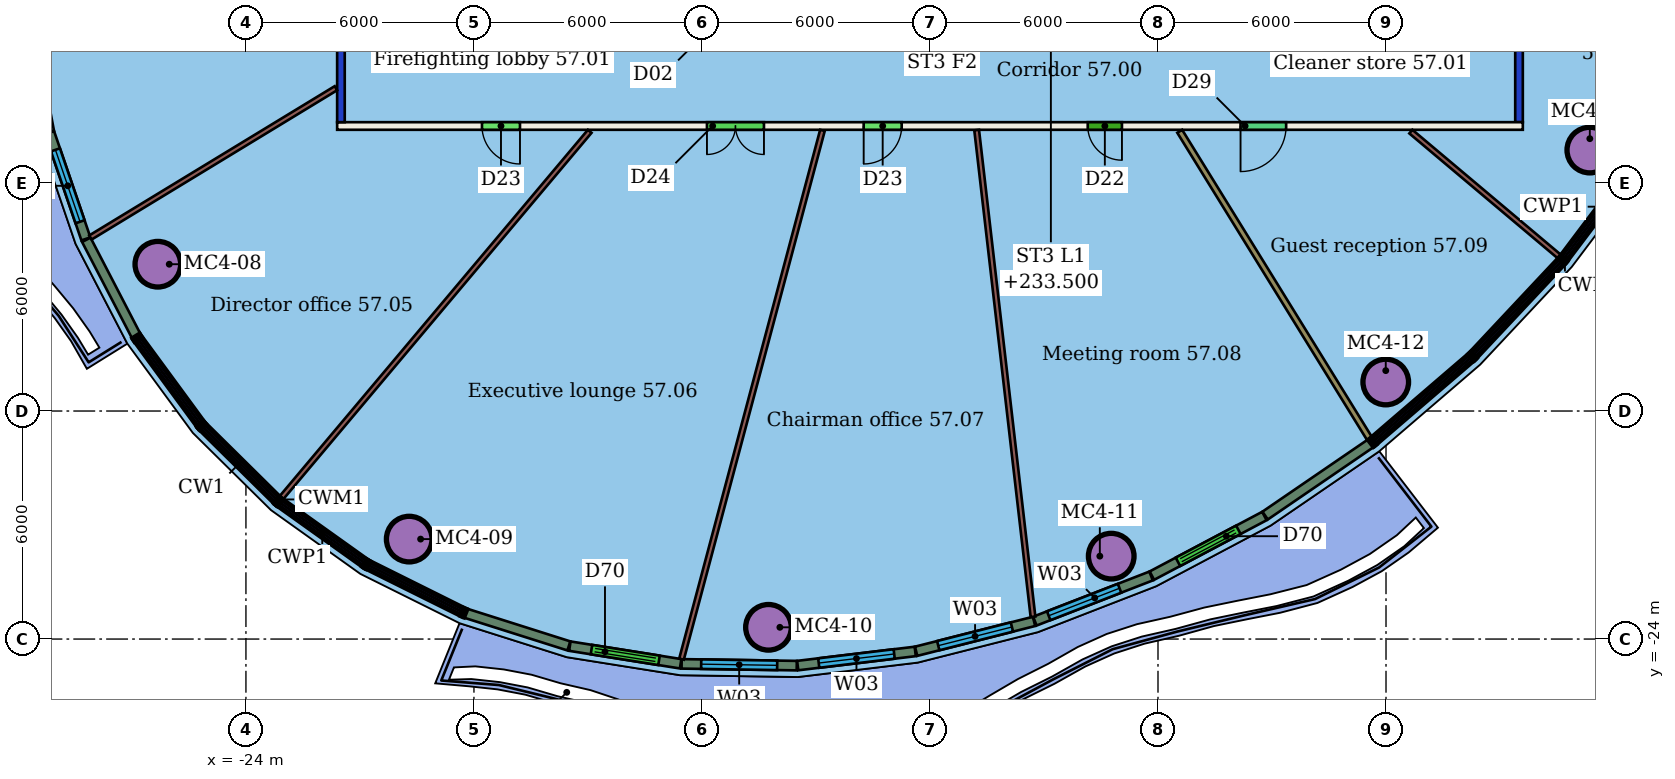
"""IFC4 building model, lengths in metres.
Left out: names, types, materials, properties, quantities, classifications, styles, units other than length and angle.
Written with IfcOpenShell. Run it as: python <this file> out.ifc"""

import sys

from ifc_helpers import new_model, si_unit, direction, frame, frame_2d, origin, origin_2d, place, context, subcontext, project, spatial, rectangle, hollow_circle, extrude, element, fill, save


model = new_model("IFC4")
c1 = context("Model", 3, precision=1e-05, world=origin(), true_north=direction((0.0, 1.0)))
c2 = subcontext(c1, "Body", "Model", "MODEL_VIEW")
j1 = project(units=[si_unit("LENGTHUNIT", "METRE"), si_unit("PLANEANGLEUNIT", "RADIAN")], contexts=[c1])
p1 = place(None, origin())
s1 = spatial("IfcSite", under=j1, at=p1, CompositionType="ELEMENT")
p2 = place(p1, origin())
s2 = spatial("IfcBuilding", under=s1, at=p2, CompositionType="ELEMENT")
p3 = place(p2, frame((0.0, 0.0, 231.7)))
s3 = spatial("IfcBuildingStorey", under=s2, at=p3, CompositionType="ELEMENT", Elevation=231.7)
for number, where, z_axis, x_axis in (
    (1, (-26.318, -14.137, 0.0), (0.0, 0.0, 1.0), (1.0, 0.0, 0.0)),
    (2, (-19.704, -21.37, 0.0), (0.0, 0.0, 1.0), (1.0, 0.0, 0.0)),
    (3, (-10.25, -23.691, 0.0), (0.0, 0.0, 1.0), (1.0, 0.0, 0.0)),
    (4, (-1.231, -21.819, 0.0), (0.0, 0.0, 1.0), (1.0, 0.0, 0.0)),
    (5, (5.993, -17.237, 0.0), (0.0, 0.0, 1.0), (1.0, 0.0, 0.0)),
    (6, (11.363, -11.134, 0.0), (0.0, 0.0, 1.0), (1.0, 0.0, 0.0)),
):
    element("IfcColumn", number, at=place(p3, frame(where, z_axis=z_axis, x_axis=x_axis)), inside=s3, PredefinedType="COLUMN", context=c2, shape_type="SweptSolid", body=[
        extrude(hollow_circle(Radius=0.6, WallThickness=0.045, at=origin_2d()), origin(), (0.0, 0.0, 1.0), 3.45),
    ])
p4 = place(p3, frame((9.6, -10.5, 0.0), z_axis=(0.0, 0.0, 1.0), x_axis=(-1.0, 0.0, 0.0)))
e7 = element("IfcWall", 7, at=p4, inside=s3, PredefinedType="PARTITIONING", context=c2, shape_type="SweptSolid", body=[
    extrude(rectangle(XDim=31.2, YDim=0.2, at=frame_2d((15.6, 0.0))), origin(), (0.0, 0.0, 1.0), 3.45),
])
p5 = place(p4, frame((26.389, 0.0, 0.0)))
e8 = element("IfcOpeningElement", 8, at=p5, cuts=e7, PredefinedType="OPENING", context=c2, shape_type="SweptSolid", body=[
    extrude(rectangle(XDim=1.0, YDim=2.4, at=frame_2d((0.5, 1.2))), frame((0.0, 0.11, 0.0), z_axis=(0.0, -1.0, 0.0), x_axis=(1.0, 0.0, 0.0)), (0.0, 0.0, 1.0), 0.22),
])
p6 = place(p4, frame((19.969, 0.0, 0.0)))
e9 = element("IfcOpeningElement", 9, at=p6, cuts=e7, PredefinedType="OPENING", context=c2, shape_type="SweptSolid", body=[
    extrude(rectangle(XDim=1.5, YDim=2.1, at=frame_2d((0.75, 1.05))), frame((0.0, 0.11, 0.0), z_axis=(0.0, -1.0, 0.0), x_axis=(1.0, 0.0, 0.0)), (0.0, 0.0, 1.0), 0.22),
])
p7 = place(p4, frame((16.344, 0.0, 0.0)))
e10 = element("IfcOpeningElement", 10, at=p7, cuts=e7, PredefinedType="OPENING", context=c2, shape_type="SweptSolid", body=[
    extrude(rectangle(XDim=1.0, YDim=2.4, at=frame_2d((0.5, 1.2))), frame((0.0, 0.11, 0.0), z_axis=(0.0, -1.0, 0.0), x_axis=(1.0, 0.0, 0.0)), (0.0, 0.0, 1.0), 0.22),
])
p8 = place(p4, frame((10.549, 0.0, 0.0)))
e11 = element("IfcOpeningElement", 11, at=p8, cuts=e7, PredefinedType="OPENING", context=c2, shape_type="SweptSolid", body=[
    extrude(rectangle(XDim=0.9, YDim=2.1, at=frame_2d((0.45, 1.05))), frame((0.0, 0.11, 0.0), z_axis=(0.0, -1.0, 0.0), x_axis=(1.0, 0.0, 0.0)), (0.0, 0.0, 1.0), 0.22),
])
p9 = place(p4, frame((6.228, 0.0, 0.0)))
e12 = element("IfcOpeningElement", 12, at=p9, cuts=e7, PredefinedType="OPENING", context=c2, shape_type="SweptSolid", body=[
    extrude(rectangle(XDim=1.2, YDim=2.4, at=frame_2d((0.6, 1.2))), frame((0.0, 0.11, 0.0), z_axis=(0.0, -1.0, 0.0), x_axis=(1.0, 0.0, 0.0)), (0.0, 0.0, 1.0), 0.22),
])
p10 = place(p3, frame((-21.5, -10.4, 0.0), z_axis=(0.0, 0.0, 1.0), x_axis=(0.0, 1.0, 0.0)))
e13 = element("IfcWall", 13, at=p10, inside=s3, PredefinedType="PARTITIONING", context=c2, shape_type="SweptSolid", body=[
    extrude(rectangle(XDim=20.8, YDim=0.2, at=frame_2d((10.4, 0.0))), origin(), (0.0, 0.0, 1.0), 3.05),
])
p11 = place(p10, frame((14.304, 0.0, 0.0)))
e14 = element("IfcOpeningElement", 14, at=p11, cuts=e13, PredefinedType="OPENING", context=c2, shape_type="SweptSolid", body=[
    extrude(rectangle(XDim=1.0, YDim=2.4, at=frame_2d((0.5, 1.2))), frame((0.0, 0.11, 0.0), z_axis=(0.0, -1.0, 0.0), x_axis=(1.0, 0.0, 0.0)), (0.0, 0.0, 1.0), 0.22),
])
p12 = place(p10, frame((7.593, 0.0, 0.0)))
e15 = element("IfcOpeningElement", 15, at=p12, cuts=e13, PredefinedType="OPENING", context=c2, shape_type="SweptSolid", body=[
    extrude(rectangle(XDim=1.0, YDim=2.4, at=frame_2d((0.5, 1.2))), frame((0.0, 0.11, 0.0), z_axis=(0.0, -1.0, 0.0), x_axis=(1.0, 0.0, 0.0)), (0.0, 0.0, 1.0), 0.22),
])
p13 = place(p3, frame((9.5, 10.4, 0.0), z_axis=(0.0, 0.0, 1.0), x_axis=(0.0, -1.0, 0.0)))
e16 = element("IfcWall", 16, at=p13, inside=s3, PredefinedType="PARTITIONING", context=c2, shape_type="SweptSolid", body=[
    extrude(rectangle(XDim=20.8, YDim=0.2, at=frame_2d((10.4, 0.0))), origin(), (0.0, 0.0, 1.0), 3.05),
])
p14 = place(p13, frame((15.989, 0.0, 0.0)))
e17 = element("IfcOpeningElement", 17, at=p14, cuts=e16, PredefinedType="OPENING", context=c2, shape_type="SweptSolid", body=[
    extrude(rectangle(XDim=1.0, YDim=2.4, at=frame_2d((0.5, 1.2))), frame((0.0, 0.11, 0.0), z_axis=(0.0, -1.0, 0.0), x_axis=(1.0, 0.0, 0.0)), (0.0, 0.0, 1.0), 0.22),
])
p15 = place(p13, frame((11.814, 0.0, 0.0)))
e18 = element("IfcOpeningElement", 18, at=p15, cuts=e16, PredefinedType="OPENING", context=c2, shape_type="SweptSolid", body=[
    extrude(rectangle(XDim=1.0, YDim=2.4, at=frame_2d((0.5, 1.2))), frame((0.0, 0.11, 0.0), z_axis=(0.0, -1.0, 0.0), x_axis=(1.0, 0.0, 0.0)), (0.0, 0.0, 1.0), 0.22),
])
p16 = place(p13, frame((6.499, 0.0, 0.0)))
e19 = element("IfcOpeningElement", 19, at=p16, cuts=e16, PredefinedType="OPENING", context=c2, shape_type="SweptSolid", body=[
    extrude(rectangle(XDim=0.9, YDim=2.1, at=frame_2d((0.45, 1.05))), frame((0.0, 0.11, 0.0), z_axis=(0.0, -1.0, 0.0), x_axis=(1.0, 0.0, 0.0)), (0.0, 0.0, 1.0), 0.22),
])
p17 = place(p13, frame((2.673, 0.0, 0.0)))
e20 = element("IfcOpeningElement", 20, at=p17, cuts=e16, PredefinedType="OPENING", context=c2, shape_type="SweptSolid", body=[
    extrude(rectangle(XDim=1.2, YDim=2.4, at=frame_2d((0.6, 1.2))), frame((0.0, 0.11, 0.0), z_axis=(0.0, -1.0, 0.0), x_axis=(1.0, 0.0, 0.0)), (0.0, 0.0, 1.0), 0.22),
])
p18 = place(p3, frame((-28.092, -13.434, 0.0), z_axis=(0.0, 0.0, 1.0), x_axis=(0.854426088505, 0.519572958574, 0.0)))
e21 = element("IfcWall", 21, at=p18, inside=s3, PredefinedType="PARTITIONING", context=c2, shape_type="SweptSolid", body=[
    extrude(rectangle(XDim=7.56, YDim=0.125, at=frame_2d((3.78, 0.0))), origin(), (0.0, 0.0, 1.0), 3.45),
])
p19 = place(p3, frame((-23.067, -20.282, 0.0), z_axis=(0.0, 0.0, 1.0), x_axis=(0.643851122285, 0.765150790585, 0.0)))
e22 = element("IfcWall", 22, at=p19, inside=s3, PredefinedType="PARTITIONING", context=c2, shape_type="SweptSolid", body=[
    extrude(rectangle(XDim=12.602, YDim=0.125, at=frame_2d((6.301, 0.0))), origin(), (0.0, 0.0, 1.0), 3.45),
])
p20 = place(p3, frame((-12.538, -24.528, 0.0), z_axis=(0.0, 0.0, 1.0), x_axis=(0.257564493881, 0.966261109376, 0.0)))
e23 = element("IfcWall", 23, at=p20, inside=s3, PredefinedType="PARTITIONING", context=c2, shape_type="SweptSolid", body=[
    extrude(rectangle(XDim=14.397, YDim=0.125, at=frame_2d((7.199, 0.0))), origin(), (0.0, 0.0, 1.0), 3.45),
])
p21 = place(p3, frame((-3.289, -23.414, 0.0), z_axis=(0.0, 0.0, 1.0), x_axis=(-0.115007216791, 0.993364656149, 0.0)))
e24 = element("IfcWall", 24, at=p21, inside=s3, PredefinedType="PARTITIONING", context=c2, shape_type="SweptSolid", body=[
    extrude(rectangle(XDim=12.892, YDim=0.125, at=frame_2d((6.446, 0.0))), origin(), (0.0, 0.0, 1.0), 3.45),
])
p22 = place(p3, frame((5.564, -18.722, 0.0), z_axis=(0.0, 0.0, 1.0), x_axis=(-0.525503275837, 0.850791576759, 0.0)))
e25 = element("IfcWall", 25, at=p22, inside=s3, PredefinedType="PARTITIONING", context=c2, shape_type="SweptSolid", body=[
    extrude(rectangle(XDim=9.5, YDim=0.15, at=frame_2d((4.75, 0.0))), origin(), (0.0, 0.0, 1.0), 3.45),
])
p23 = place(p3, frame((10.561, -13.936, 0.0), z_axis=(0.0, 0.0, 1.0), x_axis=(-0.765140481773, 0.643863373048, 0.0)))
e26 = element("IfcWall", 26, at=p23, inside=s3, PredefinedType="PARTITIONING", context=c2, shape_type="SweptSolid", body=[
    extrude(rectangle(XDim=5.107, YDim=0.125, at=frame_2d((2.554, 0.0))), origin(), (0.0, 0.0, 1.0), 3.45),
])
p24 = place(p3, frame((-29.737, -7.675, 0.0), z_axis=(0.0, 0.0, 1.0), x_axis=(0.186112401934, -0.982528459561, 0.0)))
e27 = element("IfcWall", 27, at=p24, inside=s3, PredefinedType="SOLIDWALL", context=c2, shape_type="SweptSolid", body=[
    extrude(rectangle(XDim=3.03, YDim=0.25, at=frame_2d((1.515, 0.0))), origin(), (0.0, 0.0, 1.0), 3.1),
])
p25 = place(p24, frame((0.615, 0.0, 0.0)))
e28 = element("IfcOpeningElement", 28, at=p25, cuts=e27, PredefinedType="OPENING", context=c2, shape_type="SweptSolid", body=[
    extrude(rectangle(XDim=1.8, YDim=2.4, at=frame_2d((0.9, 1.2))), frame((0.0, 0.135, 0.0), z_axis=(0.0, -1.0, 0.0), x_axis=(1.0, 0.0, 0.0)), (0.0, 0.0, 1.0), 0.27),
])
p26 = place(p3, frame((-29.167, -10.677, 0.0), z_axis=(0.0, 0.0, 1.0), x_axis=(0.32363701793, -0.946181314879, 0.0)))
e29 = element("IfcWall", 29, at=p26, inside=s3, PredefinedType="SOLIDWALL", context=c2, shape_type="SweptSolid", body=[
    extrude(rectangle(XDim=2.952, YDim=0.25, at=frame_2d((1.476, 0.0))), origin(), (0.0, 0.0, 1.0), 3.1),
])
p27 = place(p26, frame((0.476, 0.0, 0.9)))
e30 = element("IfcOpeningElement", 30, at=p27, cuts=e29, PredefinedType="OPENING", context=c2, shape_type="SweptSolid", body=[
    extrude(rectangle(XDim=2.0, YDim=2.1, at=frame_2d((1.0, 1.05))), frame((0.0, 0.135, 0.0), z_axis=(0.0, -1.0, 0.0), x_axis=(1.0, 0.0, 0.0)), (0.0, 0.0, 1.0), 0.27),
])
p28 = place(p3, frame((-28.201, -13.495, 0.0), z_axis=(0.0, 0.0, 1.0), x_axis=(0.460447402604, -0.887686988434, 0.0)))
e31 = element("IfcWall", 31, at=p28, inside=s3, PredefinedType="SOLIDWALL", context=c2, shape_type="SweptSolid", body=[
    extrude(rectangle(XDim=2.845, YDim=0.25, at=frame_2d((1.423, 0.0))), origin(), (0.0, 0.0, 1.0), 3.1),
])
p29 = place(p3, frame((-18.215, -23.321, 0.0), z_axis=(0.0, 0.0, 1.0), x_axis=(0.953313818487, -0.301981395918, 0.0)))
e32 = element("IfcWall", 32, at=p29, inside=s3, PredefinedType="SOLIDWALL", context=c2, shape_type="SweptSolid", body=[
    extrude(rectangle(XDim=2.845, YDim=0.25, at=frame_2d((1.422, 0.0))), origin(), (0.0, 0.0, 1.0), 3.1),
])
p30 = place(p3, frame((-15.477, -24.187, 0.0), z_axis=(0.0, 0.0, 1.0), x_axis=(0.987576514549, -0.157138880968, 0.0)))
e33 = element("IfcWall", 33, at=p30, inside=s3, PredefinedType="SOLIDWALL", context=c2, shape_type="SweptSolid", body=[
    extrude(rectangle(XDim=2.952, YDim=0.25, at=frame_2d((1.476, 0.0))), origin(), (0.0, 0.0, 1.0), 3.1),
])
p31 = place(p30, frame((0.576, 0.0, 0.0)))
e34 = element("IfcOpeningElement", 34, at=p31, cuts=e33, PredefinedType="OPENING", context=c2, shape_type="SweptSolid", body=[
    extrude(rectangle(XDim=1.8, YDim=2.4, at=frame_2d((0.9, 1.2))), frame((0.0, 0.135, 0.0), z_axis=(0.0, -1.0, 0.0), x_axis=(1.0, 0.0, 0.0)), (0.0, 0.0, 1.0), 0.27),
])
p32 = place(p3, frame((-12.536, -24.653, 0.0), z_axis=(0.0, 0.0, 1.0), x_axis=(0.999880339465, -0.015469542722, 0.0)))
e35 = element("IfcWall", 35, at=p32, inside=s3, PredefinedType="SOLIDWALL", context=c2, shape_type="SweptSolid", body=[
    extrude(rectangle(XDim=3.03, YDim=0.25, at=frame_2d((1.515, 0.0))), origin(), (0.0, 0.0, 1.0), 3.1),
])
p33 = place(p32, frame((0.515, 0.0, 0.9)))
e36 = element("IfcOpeningElement", 36, at=p33, cuts=e35, PredefinedType="OPENING", context=c2, shape_type="SweptSolid", body=[
    extrude(rectangle(XDim=2.0, YDim=2.1, at=frame_2d((1.0, 1.05))), frame((0.0, 0.135, 0.0), z_axis=(0.0, -1.0, 0.0), x_axis=(1.0, 0.0, 0.0)), (0.0, 0.0, 1.0), 0.27),
])
p34 = place(p3, frame((-9.481, -24.698, 0.0), z_axis=(0.0, 0.0, 1.0), x_axis=(0.992831895077, 0.119519153773, 0.0)))
e37 = element("IfcWall", 37, at=p34, inside=s3, PredefinedType="SOLIDWALL", context=c2, shape_type="SweptSolid", body=[
    extrude(rectangle(XDim=3.115, YDim=0.25, at=frame_2d((1.558, 0.0))), origin(), (0.0, 0.0, 1.0), 3.1),
])
p35 = place(p34, frame((0.558, 0.0, 0.9)))
e38 = element("IfcOpeningElement", 38, at=p35, cuts=e37, PredefinedType="OPENING", context=c2, shape_type="SweptSolid", body=[
    extrude(rectangle(XDim=2.0, YDim=2.1, at=frame_2d((1.0, 1.05))), frame((0.0, 0.135, 0.0), z_axis=(0.0, -1.0, 0.0), x_axis=(1.0, 0.0, 0.0)), (0.0, 0.0, 1.0), 0.27),
])
p36 = place(p3, frame((-6.365, -24.322, 0.0), z_axis=(0.0, 0.0, 1.0), x_axis=(0.969361212149, 0.245639655554, 0.0)))
e39 = element("IfcWall", 39, at=p36, inside=s3, PredefinedType="SOLIDWALL", context=c2, shape_type="SweptSolid", body=[
    extrude(rectangle(XDim=3.2, YDim=0.25, at=frame_2d((1.6, 0.0))), origin(), (0.0, 0.0, 1.0), 3.1),
])
p37 = place(p36, frame((0.6, 0.0, 0.9)))
e40 = element("IfcOpeningElement", 40, at=p37, cuts=e39, PredefinedType="OPENING", context=c2, shape_type="SweptSolid", body=[
    extrude(rectangle(XDim=2.0, YDim=2.1, at=frame_2d((1.0, 1.05))), frame((0.0, 0.135, 0.0), z_axis=(0.0, -1.0, 0.0), x_axis=(1.0, 0.0, 0.0)), (0.0, 0.0, 1.0), 0.27),
])
p38 = place(p3, frame((-3.24, -23.528, 0.0), z_axis=(0.0, 0.0, 1.0), x_axis=(0.932220972819, 0.361889565803, 0.0)))
e41 = element("IfcWall", 41, at=p38, inside=s3, PredefinedType="SOLIDWALL", context=c2, shape_type="SweptSolid", body=[
    extrude(rectangle(XDim=3.281, YDim=0.25, at=frame_2d((1.64, 0.0))), origin(), (0.0, 0.0, 1.0), 3.1),
])
p39 = place(p38, frame((0.39, 0.0, 0.9)))
e42 = element("IfcOpeningElement", 42, at=p39, cuts=e41, PredefinedType="OPENING", context=c2, shape_type="SweptSolid", body=[
    extrude(rectangle(XDim=2.0, YDim=2.1, at=frame_2d((1.0, 1.05))), frame((0.0, 0.135, 0.0), z_axis=(0.0, -1.0, 0.0), x_axis=(1.0, 0.0, 0.0)), (0.0, 0.0, 1.0), 0.27),
])
p40 = place(p3, frame((-0.161, -22.332, 0.0), z_axis=(0.0, 0.0, 1.0), x_axis=(0.883644332984, 0.46815883286, 0.0)))
e43 = element("IfcWall", 43, at=p40, inside=s3, PredefinedType="SOLIDWALL", context=c2, shape_type="SweptSolid", body=[
    extrude(rectangle(XDim=3.351, YDim=0.25, at=frame_2d((1.676, 0.0))), origin(), (0.0, 0.0, 1.0), 3.1),
])
p41 = place(p40, frame((0.776, 0.0, 0.0)))
e44 = element("IfcOpeningElement", 44, at=p41, cuts=e43, PredefinedType="OPENING", context=c2, shape_type="SweptSolid", body=[
    extrude(rectangle(XDim=1.8, YDim=2.4, at=frame_2d((0.9, 1.2))), frame((0.0, 0.135, 0.0), z_axis=(0.0, -1.0, 0.0), x_axis=(1.0, 0.0, 0.0)), (0.0, 0.0, 1.0), 0.27),
])
p42 = place(p3, frame((2.819, -20.751, 0.0), z_axis=(0.0, 0.0, 1.0), x_axis=(0.82535711283, 0.564611048689, 0.0)))
e45 = element("IfcWall", 45, at=p42, inside=s3, PredefinedType="SOLIDWALL", context=c2, shape_type="SweptSolid", body=[
    extrude(rectangle(XDim=3.363, YDim=0.25, at=frame_2d((1.682, 0.0))), origin(), (0.0, 0.0, 1.0), 3.1),
])
p43 = place(p5, origin())
e46 = element("IfcDoor", 46, at=p43, inside=s3, OperationType="SINGLE_SWING_LEFT", PredefinedType="DOOR", context=c2, shape_type="SweptSolid", body=[
    extrude(rectangle(XDim=1.0, YDim=2.4, at=frame_2d((0.5, 1.2))), frame((0.0, 0.025, 0.0), z_axis=(0.0, -1.0, 0.0), x_axis=(1.0, 0.0, 0.0)), (0.0, 0.0, 1.0), 0.05),
])
fill(e8, e46)
p44 = place(p6, origin())
e47 = element("IfcDoor", 47, at=p44, inside=s3, OperationType="DOUBLE_DOOR_SINGLE_SWING", PredefinedType="DOOR", context=c2, shape_type="SweptSolid", body=[
    extrude(rectangle(XDim=1.5, YDim=2.1, at=frame_2d((0.75, 1.05))), frame((0.0, 0.025, 0.0), z_axis=(0.0, -1.0, 0.0), x_axis=(1.0, 0.0, 0.0)), (0.0, 0.0, 1.0), 0.05),
])
fill(e9, e47)
p45 = place(p7, origin())
e48 = element("IfcDoor", 48, at=p45, inside=s3, OperationType="SINGLE_SWING_RIGHT", PredefinedType="DOOR", context=c2, shape_type="SweptSolid", body=[
    extrude(rectangle(XDim=1.0, YDim=2.4, at=frame_2d((0.5, 1.2))), frame((0.0, 0.025, 0.0), z_axis=(0.0, -1.0, 0.0), x_axis=(1.0, 0.0, 0.0)), (0.0, 0.0, 1.0), 0.05),
])
fill(e10, e48)
p46 = place(p8, origin())
e49 = element("IfcDoor", 49, at=p46, inside=s3, OperationType="SINGLE_SWING_LEFT", PredefinedType="DOOR", context=c2, shape_type="SweptSolid", body=[
    extrude(rectangle(XDim=0.9, YDim=2.1, at=frame_2d((0.45, 1.05))), frame((0.0, 0.025, 0.0), z_axis=(0.0, -1.0, 0.0), x_axis=(1.0, 0.0, 0.0)), (0.0, 0.0, 1.0), 0.05),
])
fill(e11, e49)
p47 = place(p9, origin())
e50 = element("IfcDoor", 50, at=p47, inside=s3, OperationType="SINGLE_SWING_RIGHT", PredefinedType="DOOR", context=c2, shape_type="SweptSolid", body=[
    extrude(rectangle(XDim=1.2, YDim=2.4, at=frame_2d((0.6, 1.2))), frame((0.0, 0.025, 0.0), z_axis=(0.0, -1.0, 0.0), x_axis=(1.0, 0.0, 0.0)), (0.0, 0.0, 1.0), 0.05),
])
fill(e12, e50)
p48 = place(p27, origin())
e51 = element("IfcWindow", 51, at=p48, inside=s3, PartitioningType="SINGLE_PANEL", PredefinedType="WINDOW", context=c2, shape_type="SweptSolid", body=[
    extrude(rectangle(XDim=2.0, YDim=2.1, at=frame_2d((1.0, 1.05))), frame((0.0, 0.03, 0.0), z_axis=(0.0, -1.0, 0.0), x_axis=(1.0, 0.0, 0.0)), (0.0, 0.0, 1.0), 0.06),
])
fill(e30, e51)
p49 = place(p31, origin())
e52 = element("IfcDoor", 52, at=p49, inside=s3, OperationType="DOUBLE_DOOR_SLIDING", PredefinedType="DOOR", context=c2, shape_type="SweptSolid", body=[
    extrude(rectangle(XDim=1.8, YDim=2.4, at=frame_2d((0.9, 1.2))), frame((0.0, 0.025, 0.0), z_axis=(0.0, -1.0, 0.0), x_axis=(1.0, 0.0, 0.0)), (0.0, 0.0, 1.0), 0.05),
])
fill(e34, e52)
p50 = place(p33, origin())
e53 = element("IfcWindow", 53, at=p50, inside=s3, PartitioningType="SINGLE_PANEL", PredefinedType="WINDOW", context=c2, shape_type="SweptSolid", body=[
    extrude(rectangle(XDim=2.0, YDim=2.1, at=frame_2d((1.0, 1.05))), frame((0.0, 0.03, 0.0), z_axis=(0.0, -1.0, 0.0), x_axis=(1.0, 0.0, 0.0)), (0.0, 0.0, 1.0), 0.06),
])
fill(e36, e53)
p51 = place(p35, origin())
e54 = element("IfcWindow", 54, at=p51, inside=s3, PartitioningType="SINGLE_PANEL", PredefinedType="WINDOW", context=c2, shape_type="SweptSolid", body=[
    extrude(rectangle(XDim=2.0, YDim=2.1, at=frame_2d((1.0, 1.05))), frame((0.0, 0.03, 0.0), z_axis=(0.0, -1.0, 0.0), x_axis=(1.0, 0.0, 0.0)), (0.0, 0.0, 1.0), 0.06),
])
fill(e38, e54)
p52 = place(p37, origin())
e55 = element("IfcWindow", 55, at=p52, inside=s3, PartitioningType="SINGLE_PANEL", PredefinedType="WINDOW", context=c2, shape_type="SweptSolid", body=[
    extrude(rectangle(XDim=2.0, YDim=2.1, at=frame_2d((1.0, 1.05))), frame((0.0, 0.03, 0.0), z_axis=(0.0, -1.0, 0.0), x_axis=(1.0, 0.0, 0.0)), (0.0, 0.0, 1.0), 0.06),
])
fill(e40, e55)
p53 = place(p39, origin())
e56 = element("IfcWindow", 56, at=p53, inside=s3, PartitioningType="SINGLE_PANEL", PredefinedType="WINDOW", context=c2, shape_type="SweptSolid", body=[
    extrude(rectangle(XDim=2.0, YDim=2.1, at=frame_2d((1.0, 1.05))), frame((0.0, 0.03, 0.0), z_axis=(0.0, -1.0, 0.0), x_axis=(1.0, 0.0, 0.0)), (0.0, 0.0, 1.0), 0.06),
])
fill(e42, e56)
p54 = place(p41, origin())
e57 = element("IfcDoor", 57, at=p54, inside=s3, OperationType="DOUBLE_DOOR_SLIDING", PredefinedType="DOOR", context=c2, shape_type="SweptSolid", body=[
    extrude(rectangle(XDim=1.8, YDim=2.4, at=frame_2d((0.9, 1.2))), frame((0.0, 0.025, 0.0), z_axis=(0.0, -1.0, 0.0), x_axis=(1.0, 0.0, 0.0)), (0.0, 0.0, 1.0), 0.05),
])
fill(e44, e57)
save(model, sys.argv[1])
